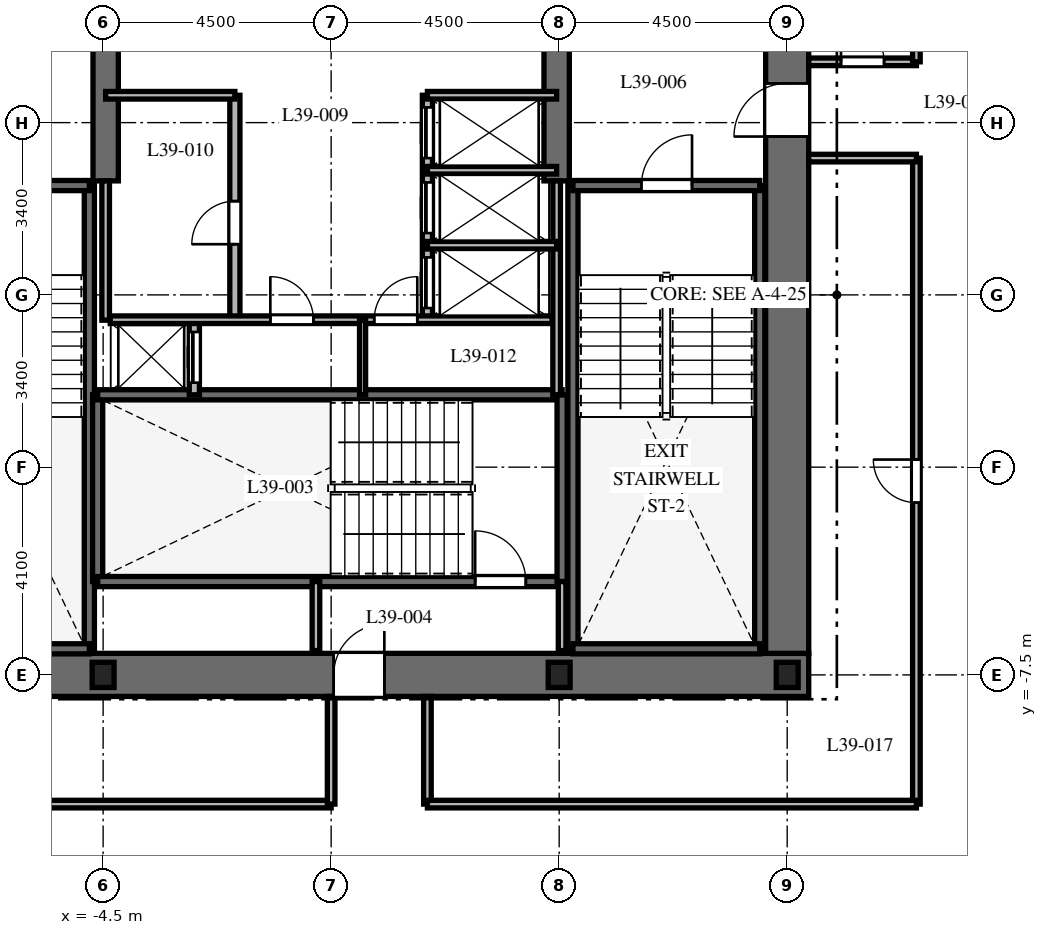
"""IFC4 building model, lengths in metres.
Left out: names, types, materials, properties, quantities, classifications, styles, units other than length and angle.
Written with IfcOpenShell. Run it as: python <this file> out.ifc"""

import sys

from ifc_helpers import new_model, si_unit, direction, frame, frame_2d, origin, origin_2d, place, context, subcontext, project, spatial, rectangle, i_section, extrude, element, fill, save


model = new_model("IFC4")
c1 = context("Model", 3, precision=1e-05, world=origin(), true_north=direction((0.0, 1.0)))
c2 = subcontext(c1, "Body", "Model", "MODEL_VIEW")
j1 = project(units=[si_unit("LENGTHUNIT", "METRE"), si_unit("PLANEANGLEUNIT", "RADIAN")], contexts=[c1])
p1 = place(None, origin())
s1 = spatial("IfcSite", under=j1, at=p1, CompositionType="ELEMENT")
p2 = place(p1, origin())
s2 = spatial("IfcBuilding", under=s1, at=p2, CompositionType="ELEMENT")
p3 = place(p2, frame((0.0, 0.0, 159.1)))
s3 = spatial("IfcBuildingStorey", under=s2, at=p3, CompositionType="ELEMENT", Elevation=159.1)
p4 = place(p3, frame((-9.425, -7.5, 0.0), z_axis=(0.0, 0.0, 1.0), x_axis=(1.0, 0.0, 0.0)))
e1 = element("IfcWall", 1, at=p4, inside=s3, PredefinedType="SHEAR", context=c2, shape_type="SweptSolid", body=[
    extrude(rectangle(XDim=18.85, YDim=0.85, at=frame_2d((9.425, 0.0))), origin(), (0.0, 0.0, 1.0), 3.7),
])
p5 = place(p4, frame((9.475, 0.0, 0.0)))
e2 = element("IfcOpeningElement", 2, at=p5, cuts=e1, PredefinedType="OPENING", context=c2, shape_type="SweptSolid", body=[
    extrude(rectangle(XDim=1.0, YDim=2.15, at=frame_2d((0.5, 1.075))), frame((0.0, 0.435, 0.0), z_axis=(0.0, -1.0, 0.0), x_axis=(1.0, 0.0, 0.0)), (0.0, 0.0, 1.0), 0.87),
])
p6 = place(p3, frame((9.0, -7.075, 0.0), z_axis=(0.0, 0.0, 1.0), x_axis=(0.0, 1.0, 0.0)))
e3 = element("IfcWall", 3, at=p6, inside=s3, PredefinedType="SHEAR", context=c2, shape_type="SweptSolid", body=[
    extrude(rectangle(XDim=14.15, YDim=0.85, at=frame_2d((7.075, 0.0))), origin(), (0.0, 0.0, 1.0), 3.7),
])
p7 = place(p6, frame((10.2, 0.0, 0.0)))
e4 = element("IfcOpeningElement", 4, at=p7, cuts=e3, PredefinedType="OPENING", context=c2, shape_type="SweptSolid", body=[
    extrude(rectangle(XDim=1.05, YDim=2.15, at=frame_2d((0.525, 1.075))), frame((0.0, 0.435, 0.0), z_axis=(0.0, -1.0, 0.0), x_axis=(1.0, 0.0, 0.0)), (0.0, 0.0, 1.0), 0.87),
])
for number, where, z_axis, x_axis in (
    (5, (-4.45, 2.25, 0.0), (0.0, 0.0, 1.0), (0.0, 1.0, 0.0)),
    (6, (4.45, 2.25, 0.0), (0.0, 0.0, 1.0), (0.0, 1.0, 0.0)),
):
    element("IfcWall", number, at=place(p3, frame(where, z_axis=z_axis, x_axis=x_axis)), inside=s3, PredefinedType="SHEAR", context=c2, shape_type="SweptSolid", body=[
        extrude(rectangle(XDim=4.825, YDim=0.5, at=frame_2d((2.413, 0.0))), origin(), (0.0, 0.0, 1.0), 3.7),
    ])
p8 = place(p3, frame((-4.772, -6.985, 0.0), z_axis=(0.0, 0.0, 1.0), x_axis=(0.0, 1.0, 0.0)))
e7 = element("IfcWall", 7, at=p8, inside=s3, PredefinedType="SHEAR", context=c2, shape_type="SweptSolid", body=[
    extrude(rectangle(XDim=9.143, YDim=0.2, at=frame_2d((4.572, 0.0))), origin(), (0.0, 0.0, 1.0), 3.7),
])
p9 = place(p3, frame((-8.458, -6.985, 0.0), z_axis=(0.0, 0.0, 1.0), x_axis=(1.0, 0.0, 0.0)))
e8 = element("IfcWall", 8, at=p9, inside=s3, PredefinedType="SHEAR", context=c2, shape_type="SweptSolid", body=[
    extrude(rectangle(XDim=3.686, YDim=0.2, at=frame_2d((1.843, 0.0))), origin(), (0.0, 0.0, 1.0), 3.7),
])
p10 = place(p3, frame((-8.458, 2.158, 0.0), z_axis=(0.0, 0.0, 1.0), x_axis=(1.0, 0.0, 0.0)))
e9 = element("IfcWall", 9, at=p10, inside=s3, PredefinedType="SHEAR", context=c2, shape_type="SweptSolid", body=[
    extrude(rectangle(XDim=3.686, YDim=0.2, at=frame_2d((1.843, 0.0))), origin(), (0.0, 0.0, 1.0), 3.7),
])
p11 = place(p10, frame((1.3, 0.0, 0.0)))
e10 = element("IfcOpeningElement", 10, at=p11, cuts=e9, PredefinedType="OPENING", context=c2, shape_type="SweptSolid", body=[
    extrude(rectangle(XDim=1.0, YDim=2.15, at=frame_2d((0.5, 1.075))), frame((0.0, 0.11, 0.0), z_axis=(0.0, -1.0, 0.0), x_axis=(1.0, 0.0, 0.0)), (0.0, 0.0, 1.0), 0.22),
])
for number, where, z_axis, x_axis in (
    (11, (4.772, -6.985, 0.0), (0.0, 0.0, 1.0), (0.0, 1.0, 0.0)),
    (12, (8.458, -6.985, 0.0), (0.0, 0.0, 1.0), (0.0, 1.0, 0.0)),
):
    element("IfcWall", number, at=place(p3, frame(where, z_axis=z_axis, x_axis=x_axis)), inside=s3, PredefinedType="SHEAR", context=c2, shape_type="SweptSolid", body=[
        extrude(rectangle(XDim=9.143, YDim=0.2, at=frame_2d((4.572, 0.0))), origin(), (0.0, 0.0, 1.0), 3.7),
    ])
p12 = place(p3, frame((4.772, -6.985, 0.0), z_axis=(0.0, 0.0, 1.0), x_axis=(1.0, 0.0, 0.0)))
e13 = element("IfcWall", 13, at=p12, inside=s3, PredefinedType="SHEAR", context=c2, shape_type="SweptSolid", body=[
    extrude(rectangle(XDim=3.686, YDim=0.2, at=frame_2d((1.843, 0.0))), origin(), (0.0, 0.0, 1.0), 3.7),
])
p13 = place(p3, frame((4.772, 2.158, 0.0), z_axis=(0.0, 0.0, 1.0), x_axis=(1.0, 0.0, 0.0)))
e14 = element("IfcWall", 14, at=p13, inside=s3, PredefinedType="SHEAR", context=c2, shape_type="SweptSolid", body=[
    extrude(rectangle(XDim=3.686, YDim=0.2, at=frame_2d((1.843, 0.0))), origin(), (0.0, 0.0, 1.0), 3.7),
])
p14 = place(p13, frame((1.35, 0.0, 0.0)))
e15 = element("IfcOpeningElement", 15, at=p14, cuts=e14, PredefinedType="OPENING", context=c2, shape_type="SweptSolid", body=[
    extrude(rectangle(XDim=1.0, YDim=2.15, at=frame_2d((0.5, 1.075))), frame((0.0, 0.11, 0.0), z_axis=(0.0, -1.0, 0.0), x_axis=(1.0, 0.0, 0.0)), (0.0, 0.0, 1.0), 0.22),
])
p15 = place(p3, frame((-4.608, -5.658, 0.0), z_axis=(0.0, 0.0, 1.0), x_axis=(0.0, 1.0, 0.0)))
e16 = element("IfcWall", 16, at=p15, inside=s3, PredefinedType="SHEAR", context=c2, shape_type="SweptSolid", body=[
    extrude(rectangle(XDim=3.686, YDim=0.2, at=frame_2d((1.843, 0.0))), origin(), (0.0, 0.0, 1.0), 3.7),
])
p16 = place(p3, frame((-4.608, -5.658, 0.0), z_axis=(0.0, 0.0, 1.0), x_axis=(1.0, 0.0, 0.0)))
e17 = element("IfcWall", 17, at=p16, inside=s3, PredefinedType="SHEAR", context=c2, shape_type="SweptSolid", body=[
    extrude(rectangle(XDim=9.166, YDim=0.2, at=frame_2d((4.583, 0.0))), origin(), (0.0, 0.0, 1.0), 3.7),
])
p17 = place(p16, frame((7.45, 0.0, 0.0)))
e18 = element("IfcOpeningElement", 18, at=p17, cuts=e17, PredefinedType="OPENING", context=c2, shape_type="SweptSolid", body=[
    extrude(rectangle(XDim=1.0, YDim=2.15, at=frame_2d((0.5, 1.075))), frame((0.0, 0.11, 0.0), z_axis=(0.0, -1.0, 0.0), x_axis=(1.0, 0.0, 0.0)), (0.0, 0.0, 1.0), 0.22),
])
p18 = place(p3, frame((-4.608, -1.972, 0.0), z_axis=(0.0, 0.0, 1.0), x_axis=(1.0, 0.0, 0.0)))
e19 = element("IfcWall", 19, at=p18, inside=s3, PredefinedType="SHEAR", context=c2, shape_type="SweptSolid", body=[
    extrude(rectangle(XDim=9.166, YDim=0.2, at=frame_2d((4.583, 0.0))), origin(), (0.0, 0.0, 1.0), 3.7),
])
p19 = place(p3, frame((4.558, -5.658, 0.0), z_axis=(0.0, 0.0, 1.0), x_axis=(0.0, 1.0, 0.0)))
e20 = element("IfcWall", 20, at=p19, inside=s3, PredefinedType="SHEAR", context=c2, shape_type="SweptSolid", body=[
    extrude(rectangle(XDim=3.686, YDim=0.2, at=frame_2d((1.843, 0.0))), origin(), (0.0, 0.0, 1.0), 3.7),
])
for number, where, z_axis, x_axis in (
    (21, (-4.5, -7.5, 0.0), (0.0, 0.0, 1.0), (1.0, 0.0, 0.0)),
    (22, (4.5, -7.5, 0.0), (0.0, 0.0, 1.0), (1.0, 0.0, 0.0)),
    (23, (9.0, -7.5, 0.0), (0.0, 0.0, 1.0), (1.0, 0.0, 0.0)),
):
    element("IfcColumn", number, at=place(p3, frame(where, z_axis=z_axis, x_axis=x_axis)), inside=s3, PredefinedType="COLUMN", context=c2, shape_type="SweptSolid", body=[
        extrude(i_section(OverallWidth=0.432, OverallDepth=0.498, WebThickness=0.056, FlangeThickness=0.089, at=origin_2d()), origin(), (0.0, 0.0, 1.0), 3.7),
    ])
for number, where, z_axis, x_axis in (
    (24, (-0.3, -7.02, 0.0), (0.0, 0.0, 1.0), (0.0, 1.0, 0.0)),
    (25, (4.558, -7.02, 0.0), (0.0, 0.0, 1.0), (0.0, 1.0, 0.0)),
):
    element("IfcWall", number, at=place(p3, frame(where, z_axis=z_axis, x_axis=x_axis)), inside=s3, PredefinedType="PARTITIONING", context=c2, shape_type="SweptSolid", body=[
        extrude(rectangle(XDim=1.362, YDim=0.15, at=frame_2d((0.681, 0.0))), origin(), (0.0, 0.0, 1.0), 3.4),
    ])
p20 = place(p3, frame((-2.7, -1.972, 0.0), z_axis=(0.0, 0.0, 1.0), x_axis=(0.0, 1.0, 0.0)))
e26 = element("IfcWall", 26, at=p20, inside=s3, PredefinedType="PARTITIONING", context=c2, shape_type="SweptSolid", body=[
    extrude(rectangle(XDim=1.472, YDim=0.2, at=frame_2d((0.736, 0.0))), origin(), (0.0, 0.0, 1.0), 3.4),
])
p21 = place(p20, frame((0.24, 0.0, 0.0)))
e27 = element("IfcOpeningElement", 27, at=p21, cuts=e26, PredefinedType="OPENING", context=c2, shape_type="SweptSolid", body=[
    extrude(rectangle(XDim=1.0, YDim=2.2, at=frame_2d((0.5, 1.1))), frame((0.0, 0.11, 0.0), z_axis=(0.0, -1.0, 0.0), x_axis=(1.0, 0.0, 0.0)), (0.0, 0.0, 1.0), 0.22),
])
p22 = place(p3, frame((-4.45, -0.5, 0.0), z_axis=(0.0, 0.0, 1.0), x_axis=(0.0, 1.0, 0.0)))
e28 = element("IfcWall", 28, at=p22, inside=s3, PredefinedType="PARTITIONING", context=c2, shape_type="SweptSolid", body=[
    extrude(rectangle(XDim=2.75, YDim=0.15, at=frame_2d((1.375, 0.0))), origin(), (0.0, 0.0, 1.0), 3.4),
])
p23 = place(p3, frame((4.45, -1.972, 0.0), z_axis=(0.0, 0.0, 1.0), x_axis=(0.0, 1.0, 0.0)))
e29 = element("IfcWall", 29, at=p23, inside=s3, PredefinedType="PARTITIONING", context=c2, shape_type="SweptSolid", body=[
    extrude(rectangle(XDim=4.222, YDim=0.15, at=frame_2d((2.111, 0.0))), origin(), (0.0, 0.0, 1.0), 3.4),
])
p24 = place(p3, frame((-1.9, -0.5, 0.0), z_axis=(0.0, 0.0, 1.0), x_axis=(0.0, 1.0, 0.0)))
e30 = element("IfcWall", 30, at=p24, inside=s3, PredefinedType="PARTITIONING", context=c2, shape_type="SweptSolid", body=[
    extrude(rectangle(XDim=4.44, YDim=0.2, at=frame_2d((2.22, 0.0))), origin(), (0.0, 0.0, 1.0), 3.4),
])
p25 = place(p24, frame((1.5, 0.0, 0.0)))
e31 = element("IfcOpeningElement", 31, at=p25, cuts=e30, PredefinedType="OPENING", context=c2, shape_type="SweptSolid", body=[
    extrude(rectangle(XDim=0.85, YDim=2.03, at=frame_2d((0.425, 1.015))), frame((0.0, 0.11, 0.0), z_axis=(0.0, -1.0, 0.0), x_axis=(1.0, 0.0, 0.0)), (0.0, 0.0, 1.0), 0.22),
])
p26 = place(p3, frame((-4.45, 3.94, 0.0), z_axis=(0.0, 0.0, 1.0), x_axis=(1.0, 0.0, 0.0)))
e32 = element("IfcWall", 32, at=p26, inside=s3, PredefinedType="PARTITIONING", context=c2, shape_type="SweptSolid", body=[
    extrude(rectangle(XDim=2.55, YDim=0.15, at=frame_2d((1.275, 0.0))), origin(), (0.0, 0.0, 1.0), 3.4),
])
p27 = place(p3, frame((1.9, -0.5, 0.0), z_axis=(0.0, 0.0, 1.0), x_axis=(0.0, 1.0, 0.0)))
e33 = element("IfcWall", 33, at=p27, inside=s3, PredefinedType="PARTITIONING", context=c2, shape_type="SweptSolid", body=[
    extrude(rectangle(XDim=4.44, YDim=0.2, at=frame_2d((2.22, 0.0))), origin(), (0.0, 0.0, 1.0), 3.4),
])
p28 = place(p27, frame((0.24, 0.0, 0.0)))
e34 = element("IfcOpeningElement", 34, at=p28, cuts=e33, PredefinedType="OPENING", context=c2, shape_type="SweptSolid", body=[
    extrude(rectangle(XDim=1.0, YDim=2.2, at=frame_2d((0.5, 1.1))), frame((0.0, 0.11, 0.0), z_axis=(0.0, -1.0, 0.0), x_axis=(1.0, 0.0, 0.0)), (0.0, 0.0, 1.0), 0.22),
])
p29 = place(p27, frame((1.72, 0.0, 0.0)))
e35 = element("IfcOpeningElement", 35, at=p29, cuts=e33, PredefinedType="OPENING", context=c2, shape_type="SweptSolid", body=[
    extrude(rectangle(XDim=1.0, YDim=2.2, at=frame_2d((0.5, 1.1))), frame((0.0, 0.11, 0.0), z_axis=(0.0, -1.0, 0.0), x_axis=(1.0, 0.0, 0.0)), (0.0, 0.0, 1.0), 0.22),
])
p30 = place(p27, frame((3.2, 0.0, 0.0)))
e36 = element("IfcOpeningElement", 36, at=p30, cuts=e33, PredefinedType="OPENING", context=c2, shape_type="SweptSolid", body=[
    extrude(rectangle(XDim=1.0, YDim=2.2, at=frame_2d((0.5, 1.1))), frame((0.0, 0.11, 0.0), z_axis=(0.0, -1.0, 0.0), x_axis=(1.0, 0.0, 0.0)), (0.0, 0.0, 1.0), 0.22),
])
for number, where, z_axis, x_axis in (
    (37, (1.9, 3.94, 0.0), (0.0, 0.0, 1.0), (1.0, 0.0, 0.0)),
    (38, (1.9, 0.98, 0.0), (0.0, 0.0, 1.0), (1.0, 0.0, 0.0)),
    (39, (1.9, 2.46, 0.0), (0.0, 0.0, 1.0), (1.0, 0.0, 0.0)),
):
    element("IfcWall", number, at=place(p3, frame(where, z_axis=z_axis, x_axis=x_axis)), inside=s3, PredefinedType="PARTITIONING", context=c2, shape_type="SweptSolid", body=[
        extrude(rectangle(XDim=2.55, YDim=0.15, at=frame_2d((1.275, 0.0))), origin(), (0.0, 0.0, 1.0), 3.4),
    ])
p31 = place(p3, frame((-4.36, -0.49, 0.0), z_axis=(0.0, 0.0, 1.0), x_axis=(1.0, 0.0, 0.0)))
e40 = element("IfcWall", 40, at=p31, inside=s3, PredefinedType="PARTITIONING", context=c2, shape_type="SweptSolid", body=[
    extrude(rectangle(XDim=8.72, YDim=0.15, at=frame_2d((4.36, 0.0))), origin(), (0.0, 0.0, 1.0), 3.4),
])
p32 = place(p31, frame((3.16, 0.0, 0.0)))
e41 = element("IfcOpeningElement", 41, at=p32, cuts=e40, PredefinedType="OPENING", context=c2, shape_type="SweptSolid", body=[
    extrude(rectangle(XDim=0.85, YDim=2.03, at=frame_2d((0.425, 1.015))), frame((0.0, 0.085, 0.0), z_axis=(0.0, -1.0, 0.0), x_axis=(1.0, 0.0, 0.0)), (0.0, 0.0, 1.0), 0.17),
])
p33 = place(p31, frame((5.21, 0.0, 0.0)))
e42 = element("IfcOpeningElement", 42, at=p33, cuts=e40, PredefinedType="OPENING", context=c2, shape_type="SweptSolid", body=[
    extrude(rectangle(XDim=0.85, YDim=2.03, at=frame_2d((0.425, 1.015))), frame((0.0, 0.085, 0.0), z_axis=(0.0, -1.0, 0.0), x_axis=(1.0, 0.0, 0.0)), (0.0, 0.0, 1.0), 0.17),
])
p34 = place(p3, frame((0.62, -1.972, 0.0), z_axis=(0.0, 0.0, 1.0), x_axis=(0.0, 1.0, 0.0)))
e43 = element("IfcWall", 43, at=p34, inside=s3, PredefinedType="PARTITIONING", context=c2, shape_type="SweptSolid", body=[
    extrude(rectangle(XDim=1.472, YDim=0.12, at=frame_2d((0.736, 0.0))), origin(), (0.0, 0.0, 1.0), 3.4),
])
p35 = place(p3, frame((11.55, -10.05, 0.0), z_axis=(0.0, 0.0, 1.0), x_axis=(0.0, 1.0, 0.0)))
e44 = element("IfcWall", 44, at=p35, inside=s3, PredefinedType="PARTITIONING", context=c2, shape_type="SweptSolid", body=[
    extrude(rectangle(XDim=12.75, YDim=0.15, at=frame_2d((6.375, 0.0))), origin(), (0.0, 0.0, 1.0), 2.84),
])
p36 = place(p35, frame((5.95, 0.0, 0.0)))
e45 = element("IfcOpeningElement", 45, at=p36, cuts=e44, PredefinedType="OPENING", context=c2, shape_type="SweptSolid", body=[
    extrude(rectangle(XDim=0.85, YDim=2.03, at=frame_2d((0.425, 1.015))), frame((0.0, 0.085, 0.0), z_axis=(0.0, -1.0, 0.0), x_axis=(1.0, 0.0, 0.0)), (0.0, 0.0, 1.0), 0.17),
])
p37 = place(p3, frame((11.55, 2.7, 0.0), z_axis=(0.0, 0.0, 1.0), x_axis=(-1.0, 0.0, 0.0)))
e46 = element("IfcWall", 46, at=p37, inside=s3, PredefinedType="PARTITIONING", context=c2, shape_type="SweptSolid", body=[
    extrude(rectangle(XDim=2.125, YDim=0.15, at=frame_2d((1.062, 0.0))), origin(), (0.0, 0.0, 1.0), 3.4),
])
p38 = place(p3, frame((9.425, 4.6, 0.0), z_axis=(0.0, 0.0, 1.0), x_axis=(1.0, 0.0, 0.0)))
e47 = element("IfcWall", 47, at=p38, inside=s3, PredefinedType="PARTITIONING", context=c2, shape_type="SweptSolid", body=[
    extrude(rectangle(XDim=2.125, YDim=0.15, at=frame_2d((1.062, 0.0))), origin(), (0.0, 0.0, 1.0), 3.4),
])
p39 = place(p38, frame((0.637, 0.0, 0.0)))
e48 = element("IfcOpeningElement", 48, at=p39, cuts=e47, PredefinedType="OPENING", context=c2, shape_type="SweptSolid", body=[
    extrude(rectangle(XDim=0.85, YDim=2.03, at=frame_2d((0.425, 1.015))), frame((0.0, 0.085, 0.0), z_axis=(0.0, -1.0, 0.0), x_axis=(1.0, 0.0, 0.0)), (0.0, 0.0, 1.0), 0.17),
])
p40 = place(p3, frame((11.55, 4.6, 0.0), z_axis=(0.0, 0.0, 1.0), x_axis=(0.0, 1.0, 0.0)))
e49 = element("IfcWall", 49, at=p40, inside=s3, PredefinedType="PARTITIONING", context=c2, shape_type="SweptSolid", body=[
    extrude(rectangle(XDim=5.45, YDim=0.15, at=frame_2d((2.725, 0.0))), origin(), (0.0, 0.0, 1.0), 2.84),
])
p41 = place(p3, frame((-11.55, -10.05, 0.0), z_axis=(0.0, 0.0, 1.0), x_axis=(1.0, 0.0, 0.0)))
e50 = element("IfcWall", 50, at=p41, inside=s3, PredefinedType="PARTITIONING", context=c2, shape_type="SweptSolid", body=[
    extrude(rectangle(XDim=11.55, YDim=0.15, at=frame_2d((5.775, 0.0))), origin(), (0.0, 0.0, 1.0), 2.84),
])
for number, where, z_axis, x_axis in (
    (51, (0.0, -10.05, 0.0), (0.0, 0.0, 1.0), (0.0, 1.0, 0.0)),
    (52, (1.9, -7.925, 0.0), (0.0, 0.0, 1.0), (0.0, -1.0, 0.0)),
):
    element("IfcWall", number, at=place(p3, frame(where, z_axis=z_axis, x_axis=x_axis)), inside=s3, PredefinedType="PARTITIONING", context=c2, shape_type="SweptSolid", body=[
        extrude(rectangle(XDim=2.125, YDim=0.15, at=frame_2d((1.062, 0.0))), origin(), (0.0, 0.0, 1.0), 3.4),
    ])
p42 = place(p3, frame((1.9, -10.05, 0.0), z_axis=(0.0, 0.0, 1.0), x_axis=(1.0, 0.0, 0.0)))
e53 = element("IfcWall", 53, at=p42, inside=s3, PredefinedType="PARTITIONING", context=c2, shape_type="SweptSolid", body=[
    extrude(rectangle(XDim=9.65, YDim=0.15, at=frame_2d((4.825, 0.0))), origin(), (0.0, 0.0, 1.0), 2.84),
])
p43 = place(p14, origin())
e54 = element("IfcDoor", 54, at=p43, inside=s3, OperationType="SINGLE_SWING_RIGHT", PredefinedType="DOOR", context=c2, shape_type="SweptSolid", body=[
    extrude(rectangle(XDim=1.0, YDim=2.15, at=frame_2d((0.5, 1.075))), frame((0.0, 0.025, 0.0), z_axis=(0.0, -1.0, 0.0), x_axis=(1.0, 0.0, 0.0)), (0.0, 0.0, 1.0), 0.05),
])
fill(e15, e54)
p44 = place(p17, origin())
e55 = element("IfcDoor", 55, at=p44, inside=s3, OperationType="SINGLE_SWING_LEFT", PredefinedType="DOOR", context=c2, shape_type="SweptSolid", body=[
    extrude(rectangle(XDim=1.0, YDim=2.15, at=frame_2d((0.5, 1.075))), frame((0.0, 0.025, 0.0), z_axis=(0.0, -1.0, 0.0), x_axis=(1.0, 0.0, 0.0)), (0.0, 0.0, 1.0), 0.05),
])
fill(e18, e55)
p45 = place(p5, origin())
e56 = element("IfcDoor", 56, at=p45, inside=s3, OperationType="SINGLE_SWING_RIGHT", PredefinedType="DOOR", context=c2, shape_type="SweptSolid", body=[
    extrude(rectangle(XDim=1.0, YDim=2.15, at=frame_2d((0.5, 1.075))), frame((0.0, 0.025, 0.0), z_axis=(0.0, -1.0, 0.0), x_axis=(1.0, 0.0, 0.0)), (0.0, 0.0, 1.0), 0.05),
])
fill(e2, e56)
p46 = place(p7, origin())
e57 = element("IfcDoor", 57, at=p46, inside=s3, OperationType="SINGLE_SWING_LEFT", PredefinedType="DOOR", context=c2, shape_type="SweptSolid", body=[
    extrude(rectangle(XDim=1.05, YDim=2.15, at=frame_2d((0.525, 1.075))), frame((0.0, 0.025, 0.0), z_axis=(0.0, -1.0, 0.0), x_axis=(1.0, 0.0, 0.0)), (0.0, 0.0, 1.0), 0.05),
])
fill(e4, e57)
p47 = place(p21, origin())
e58 = element("IfcDoor", 58, at=p47, inside=s3, OperationType="SLIDING_TO_LEFT", PredefinedType="DOOR", context=c2, shape_type="SweptSolid", body=[
    extrude(rectangle(XDim=1.0, YDim=2.2, at=frame_2d((0.5, 1.1))), frame((0.0, 0.025, 0.0), z_axis=(0.0, -1.0, 0.0), x_axis=(1.0, 0.0, 0.0)), (0.0, 0.0, 1.0), 0.05),
])
fill(e27, e58)
p48 = place(p25, origin())
e59 = element("IfcDoor", 59, at=p48, inside=s3, OperationType="SINGLE_SWING_LEFT", PredefinedType="DOOR", context=c2, shape_type="SweptSolid", body=[
    extrude(rectangle(XDim=0.85, YDim=2.03, at=frame_2d((0.425, 1.015))), frame((0.0, 0.025, 0.0), z_axis=(0.0, -1.0, 0.0), x_axis=(1.0, 0.0, 0.0)), (0.0, 0.0, 1.0), 0.05),
])
fill(e31, e59)
p49 = place(p28, origin())
e60 = element("IfcDoor", 60, at=p49, inside=s3, OperationType="SLIDING_TO_RIGHT", PredefinedType="DOOR", context=c2, shape_type="SweptSolid", body=[
    extrude(rectangle(XDim=1.0, YDim=2.2, at=frame_2d((0.5, 1.1))), frame((0.0, 0.025, 0.0), z_axis=(0.0, -1.0, 0.0), x_axis=(1.0, 0.0, 0.0)), (0.0, 0.0, 1.0), 0.05),
])
fill(e34, e60)
p50 = place(p29, origin())
e61 = element("IfcDoor", 61, at=p50, inside=s3, OperationType="SLIDING_TO_RIGHT", PredefinedType="DOOR", context=c2, shape_type="SweptSolid", body=[
    extrude(rectangle(XDim=1.0, YDim=2.2, at=frame_2d((0.5, 1.1))), frame((0.0, 0.025, 0.0), z_axis=(0.0, -1.0, 0.0), x_axis=(1.0, 0.0, 0.0)), (0.0, 0.0, 1.0), 0.05),
])
fill(e35, e61)
p51 = place(p30, origin())
e62 = element("IfcDoor", 62, at=p51, inside=s3, OperationType="SLIDING_TO_RIGHT", PredefinedType="DOOR", context=c2, shape_type="SweptSolid", body=[
    extrude(rectangle(XDim=1.0, YDim=2.2, at=frame_2d((0.5, 1.1))), frame((0.0, 0.025, 0.0), z_axis=(0.0, -1.0, 0.0), x_axis=(1.0, 0.0, 0.0)), (0.0, 0.0, 1.0), 0.05),
])
fill(e36, e62)
p52 = place(p32, origin())
e63 = element("IfcDoor", 63, at=p52, inside=s3, OperationType="SINGLE_SWING_LEFT", PredefinedType="DOOR", context=c2, shape_type="SweptSolid", body=[
    extrude(rectangle(XDim=0.85, YDim=2.03, at=frame_2d((0.425, 1.015))), frame((0.0, 0.025, 0.0), z_axis=(0.0, -1.0, 0.0), x_axis=(1.0, 0.0, 0.0)), (0.0, 0.0, 1.0), 0.05),
])
fill(e41, e63)
p53 = place(p33, origin())
e64 = element("IfcDoor", 64, at=p53, inside=s3, OperationType="SINGLE_SWING_RIGHT", PredefinedType="DOOR", context=c2, shape_type="SweptSolid", body=[
    extrude(rectangle(XDim=0.85, YDim=2.03, at=frame_2d((0.425, 1.015))), frame((0.0, 0.025, 0.0), z_axis=(0.0, -1.0, 0.0), x_axis=(1.0, 0.0, 0.0)), (0.0, 0.0, 1.0), 0.05),
])
fill(e42, e64)
p54 = place(p39, origin())
e65 = element("IfcDoor", 65, at=p54, inside=s3, OperationType="SINGLE_SWING_LEFT", PredefinedType="DOOR", context=c2, shape_type="SweptSolid", body=[
    extrude(rectangle(XDim=0.85, YDim=2.03, at=frame_2d((0.425, 1.015))), frame((0.0, 0.025, 0.0), z_axis=(0.0, -1.0, 0.0), x_axis=(1.0, 0.0, 0.0)), (0.0, 0.0, 1.0), 0.05),
])
fill(e48, e65)
p55 = place(p36, origin())
e66 = element("IfcDoor", 66, at=p55, inside=s3, OperationType="SINGLE_SWING_RIGHT", PredefinedType="DOOR", context=c2, shape_type="SweptSolid", body=[
    extrude(rectangle(XDim=0.85, YDim=2.03, at=frame_2d((0.425, 1.015))), frame((0.0, 0.025, 0.0), z_axis=(0.0, -1.0, 0.0), x_axis=(1.0, 0.0, 0.0)), (0.0, 0.0, 1.0), 0.05),
])
fill(e45, e66)
save(model, sys.argv[1])
